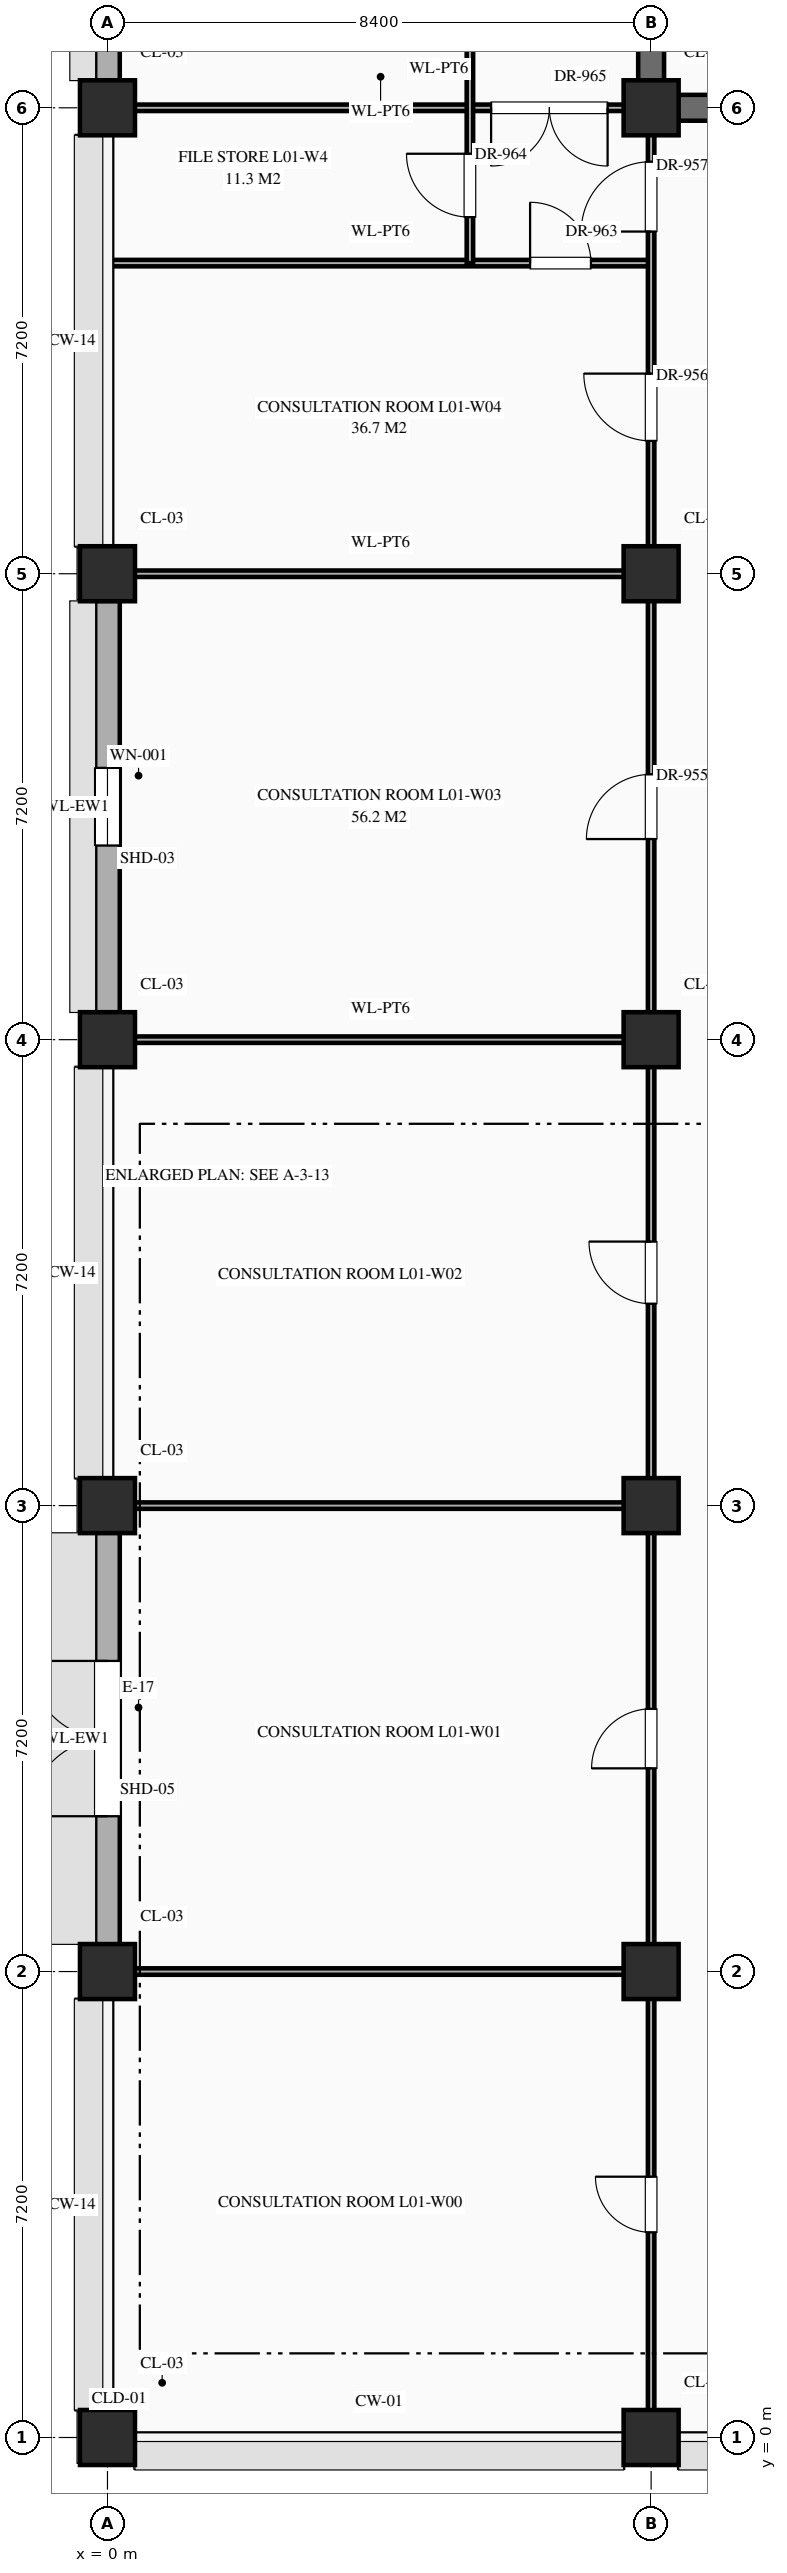
"""IFC4 building model, lengths in metres.
Left out: names, types, materials, properties, quantities, classifications, styles, units other than length and angle.
Written with IfcOpenShell. Run it as: python <this file> out.ifc"""

import sys

from ifc_helpers import new_model, si_unit, direction, frame, frame_2d, origin, origin_2d, place, context, subcontext, project, spatial, rectangle, extrude, element, fill, save


model = new_model("IFC4")
c1 = context("Model", 3, precision=1e-05, world=origin(), true_north=direction((0.0, 1.0)))
c2 = subcontext(c1, "Body", "Model", "MODEL_VIEW")
j1 = project(units=[si_unit("LENGTHUNIT", "METRE"), si_unit("PLANEANGLEUNIT", "RADIAN")], contexts=[c1])
p1 = place(None, origin())
s1 = spatial("IfcSite", under=j1, at=p1, CompositionType="ELEMENT")
p2 = place(p1, origin())
s2 = spatial("IfcBuilding", under=s1, at=p2, CompositionType="ELEMENT")
p3 = place(p2, origin())
s3 = spatial("IfcBuildingStorey", under=s2, at=p3, CompositionType="ELEMENT", Elevation=0.0)
for number, where, z_axis, x_axis in (
    (1, (0.0, 0.0, 0.0), (0.0, 0.0, 1.0), (1.0, 0.0, 0.0)),
    (2, (0.0, 7.2, 0.0), (0.0, 0.0, 1.0), (1.0, 0.0, 0.0)),
    (3, (0.0, 14.4, 0.0), (0.0, 0.0, 1.0), (1.0, 0.0, 0.0)),
    (4, (0.0, 21.6, 0.0), (0.0, 0.0, 1.0), (1.0, 0.0, 0.0)),
    (5, (0.0, 28.8, 0.0), (0.0, 0.0, 1.0), (1.0, 0.0, 0.0)),
    (6, (0.0, 36.0, 0.0), (0.0, 0.0, 1.0), (1.0, 0.0, 0.0)),
    (7, (8.4, 0.0, 0.0), (0.0, 0.0, 1.0), (1.0, 0.0, 0.0)),
    (8, (8.4, 7.2, 0.0), (0.0, 0.0, 1.0), (1.0, 0.0, 0.0)),
    (9, (8.4, 14.4, 0.0), (0.0, 0.0, 1.0), (1.0, 0.0, 0.0)),
    (10, (8.4, 21.6, 0.0), (0.0, 0.0, 1.0), (1.0, 0.0, 0.0)),
    (11, (8.4, 28.8, 0.0), (0.0, 0.0, 1.0), (1.0, 0.0, 0.0)),
    (12, (8.4, 36.0, 0.0), (0.0, 0.0, 1.0), (1.0, 0.0, 0.0)),
):
    element("IfcColumn", number, at=place(p3, frame(where, z_axis=z_axis, x_axis=x_axis)), inside=s3, PredefinedType="COLUMN", context=c2, shape_type="SweptSolid", body=[
        extrude(rectangle(XDim=0.85, YDim=0.85, at=origin_2d()), origin(), (0.0, 0.0, 1.0), 5.4),
    ])
p4 = place(p3, frame((0.0, 7.62, 0.0), z_axis=(0.0, 0.0, 1.0), x_axis=(0.0, 1.0, 0.0)))
e13 = element("IfcWall", 13, at=p4, inside=s3, PredefinedType="STANDARD", context=c2, shape_type="SweptSolid", body=[
    extrude(rectangle(XDim=6.36, YDim=0.38, at=frame_2d((3.18, 0.0))), origin(), (0.0, 0.0, 1.0), 4.47),
])
p5 = place(p4, frame((1.98, 0.0, 0.0)))
e14 = element("IfcOpeningElement", 14, at=p5, cuts=e13, PredefinedType="OPENING", context=c2, shape_type="SweptSolid", body=[
    extrude(rectangle(XDim=2.4, YDim=2.4, at=frame_2d((1.2, 1.2))), frame((0.0, 0.202, 0.0), z_axis=(0.0, -1.0, 0.0), x_axis=(1.0, 0.0, 0.0)), (0.0, 0.0, 1.0), 0.404),
])
p6 = place(p3, frame((0.0, 22.02, 0.0), z_axis=(0.0, 0.0, 1.0), x_axis=(0.0, 1.0, 0.0)))
e15 = element("IfcWall", 15, at=p6, inside=s3, PredefinedType="STANDARD", context=c2, shape_type="SweptSolid", body=[
    extrude(rectangle(XDim=6.36, YDim=0.38, at=frame_2d((3.18, 0.0))), origin(), (0.0, 0.0, 1.0), 4.47),
])
p7 = place(p6, frame((2.58, 0.0, 0.85)))
e16 = element("IfcOpeningElement", 16, at=p7, cuts=e15, PredefinedType="OPENING", context=c2, shape_type="SweptSolid", body=[
    extrude(rectangle(XDim=1.2, YDim=1.2, at=frame_2d((0.6, 0.6))), frame((0.0, 0.202, 0.0), z_axis=(0.0, -1.0, 0.0), x_axis=(1.0, 0.0, 0.0)), (0.0, 0.0, 1.0), 0.404),
])
p8 = place(p3, frame((0.0, 36.42, 0.0), z_axis=(0.0, 0.0, 1.0), x_axis=(0.0, 1.0, 0.0)))
e17 = element("IfcWall", 17, at=p8, inside=s3, PredefinedType="STANDARD", context=c2, shape_type="SweptSolid", body=[
    extrude(rectangle(XDim=6.36, YDim=0.38, at=frame_2d((3.18, 0.0))), origin(), (0.0, 0.0, 1.0), 4.47),
])
p9 = place(p8, frame((2.58, 0.0, 0.85)))
e18 = element("IfcOpeningElement", 18, at=p9, cuts=e17, PredefinedType="OPENING", context=c2, shape_type="SweptSolid", body=[
    extrude(rectangle(XDim=1.2, YDim=1.56, at=frame_2d((0.6, 0.78))), frame((0.0, 0.202, 0.0), z_axis=(0.0, -1.0, 0.0), x_axis=(1.0, 0.0, 0.0)), (0.0, 0.0, 1.0), 0.404),
])
for number, where, z_axis, x_axis in (
    (19, (0.04, 7.2, 0.0), (0.0, 0.0, 1.0), (1.0, 0.0, 0.0)),
    (20, (0.04, 14.4, 0.0), (0.0, 0.0, 1.0), (1.0, 0.0, 0.0)),
    (21, (0.04, 21.6, 0.0), (0.0, 0.0, 1.0), (1.0, 0.0, 0.0)),
    (22, (0.04, 28.8, 0.0), (0.0, 0.0, 1.0), (1.0, 0.0, 0.0)),
):
    element("IfcWall", number, at=place(p3, frame(where, z_axis=z_axis, x_axis=x_axis)), inside=s3, PredefinedType="STANDARD", context=c2, shape_type="SweptSolid", body=[
        extrude(rectangle(XDim=8.36, YDim=0.1, at=frame_2d((4.18, 0.0))), origin(), (0.0, 0.0, 1.0), 4.27),
    ])
p10 = place(p3, frame((0.04, 33.6, 0.0), z_axis=(0.0, 0.0, 1.0), x_axis=(1.0, 0.0, 0.0)))
e23 = element("IfcWall", 23, at=p10, inside=s3, PredefinedType="STANDARD", context=c2, shape_type="SweptSolid", body=[
    extrude(rectangle(XDim=8.36, YDim=0.1, at=frame_2d((4.18, 0.0))), origin(), (0.0, 0.0, 1.0), 5.12),
])
p11 = place(p10, frame((6.49, 0.0, 0.0)))
e24 = element("IfcOpeningElement", 24, at=p11, cuts=e23, PredefinedType="OPENING", context=c2, shape_type="SweptSolid", body=[
    extrude(rectangle(XDim=0.94, YDim=2.3, at=frame_2d((0.47, 1.15))), frame((0.0, 0.062, 0.0), z_axis=(0.0, -1.0, 0.0), x_axis=(1.0, 0.0, 0.0)), (0.0, 0.0, 1.0), 0.124),
])
p12 = place(p3, frame((0.04, 36.0, 0.0), z_axis=(0.0, 0.0, 1.0), x_axis=(1.0, 0.0, 0.0)))
e25 = element("IfcWall", 25, at=p12, inside=s3, PredefinedType="STANDARD", context=c2, shape_type="SweptSolid", body=[
    extrude(rectangle(XDim=8.36, YDim=0.1, at=frame_2d((4.18, 0.0))), origin(), (0.0, 0.0, 1.0), 4.27),
])
p13 = place(p12, frame((5.887, 0.0, 0.0)))
e26 = element("IfcOpeningElement", 26, at=p13, cuts=e25, PredefinedType="OPENING", context=c2, shape_type="SweptSolid", body=[
    extrude(rectangle(XDim=1.8, YDim=2.5, at=frame_2d((0.9, 1.25))), frame((0.0, 0.062, 0.0), z_axis=(0.0, -1.0, 0.0), x_axis=(1.0, 0.0, 0.0)), (0.0, 0.0, 1.0), 0.124),
])
p14 = place(p3, frame((8.4, 36.0, 0.0), z_axis=(0.0, 0.0, 1.0), x_axis=(1.0, 0.0, 0.0)))
e27 = element("IfcWall", 27, at=p14, inside=s3, PredefinedType="SHEAR", context=c2, shape_type="SweptSolid", body=[
    extrude(rectangle(XDim=8.36, YDim=0.4, at=frame_2d((4.18, 0.0))), origin(), (0.0, 0.0, 1.0), 5.12),
])
p15 = place(p3, frame((5.6, 33.6, 0.0), z_axis=(0.0, 0.0, 1.0), x_axis=(0.0, 1.0, 0.0)))
e28 = element("IfcWall", 28, at=p15, inside=s3, PredefinedType="STANDARD", context=c2, shape_type="SweptSolid", body=[
    extrude(rectangle(XDim=12.0, YDim=0.1, at=frame_2d((6.0, 0.0))), origin(), (0.0, 0.0, 1.0), 5.12),
])
p16 = place(p15, frame((0.71, 0.0, 0.0)))
e29 = element("IfcOpeningElement", 29, at=p16, cuts=e28, PredefinedType="OPENING", context=c2, shape_type="SweptSolid", body=[
    extrude(rectangle(XDim=0.98, YDim=2.35, at=frame_2d((0.49, 1.175))), frame((0.0, 0.062, 0.0), z_axis=(0.0, -1.0, 0.0), x_axis=(1.0, 0.0, 0.0)), (0.0, 0.0, 1.0), 0.124),
])
p17 = place(p15, frame((5.47, 0.0, 0.0)))
e30 = element("IfcOpeningElement", 30, at=p17, cuts=e28, PredefinedType="OPENING", context=c2, shape_type="SweptSolid", body=[
    extrude(rectangle(XDim=1.06, YDim=2.4, at=frame_2d((0.53, 1.2))), frame((0.0, 0.062, 0.0), z_axis=(0.0, -1.0, 0.0), x_axis=(1.0, 0.0, 0.0)), (0.0, 0.0, 1.0), 0.124),
])
p18 = place(p15, frame((10.35, 0.0, 0.0)))
e31 = element("IfcOpeningElement", 31, at=p18, cuts=e28, PredefinedType="OPENING", context=c2, shape_type="SweptSolid", body=[
    extrude(rectangle(XDim=0.9, YDim=2.15, at=frame_2d((0.45, 1.075))), frame((0.0, 0.062, 0.0), z_axis=(0.0, -1.0, 0.0), x_axis=(1.0, 0.0, 0.0)), (0.0, 0.0, 1.0), 0.124),
])
p19 = place(p3, frame((8.4, 0.04, 0.0), z_axis=(0.0, 0.0, 1.0), x_axis=(0.0, 1.0, 0.0)))
e32 = element("IfcWall", 32, at=p19, inside=s3, PredefinedType="STANDARD", context=c2, shape_type="SweptSolid", body=[
    extrude(rectangle(XDim=35.96, YDim=0.1, at=frame_2d((17.98, 0.0))), origin(), (0.0, 0.0, 1.0), 4.37),
])
p20 = place(p19, frame((3.13, 0.0, 0.0)))
e33 = element("IfcOpeningElement", 33, at=p20, cuts=e32, PredefinedType="OPENING", context=c2, shape_type="SweptSolid", body=[
    extrude(rectangle(XDim=0.86, YDim=2.1, at=frame_2d((0.43, 1.05))), frame((0.0, 0.062, 0.0), z_axis=(0.0, -1.0, 0.0), x_axis=(1.0, 0.0, 0.0)), (0.0, 0.0, 1.0), 0.124),
])
p21 = place(p19, frame((10.3, 0.0, 0.0)))
e34 = element("IfcOpeningElement", 34, at=p21, cuts=e32, PredefinedType="OPENING", context=c2, shape_type="SweptSolid", body=[
    extrude(rectangle(XDim=0.92, YDim=2.15, at=frame_2d((0.46, 1.075))), frame((0.0, 0.062, 0.0), z_axis=(0.0, -1.0, 0.0), x_axis=(1.0, 0.0, 0.0)), (0.0, 0.0, 1.0), 0.124),
])
p22 = place(p19, frame((17.48, 0.0, 0.0)))
e35 = element("IfcOpeningElement", 35, at=p22, cuts=e32, PredefinedType="OPENING", context=c2, shape_type="SweptSolid", body=[
    extrude(rectangle(XDim=0.96, YDim=2.2, at=frame_2d((0.48, 1.1))), frame((0.0, 0.062, 0.0), z_axis=(0.0, -1.0, 0.0), x_axis=(1.0, 0.0, 0.0)), (0.0, 0.0, 1.0), 0.124),
])
p23 = place(p19, frame((24.66, 0.0, 0.0)))
e36 = element("IfcOpeningElement", 36, at=p23, cuts=e32, PredefinedType="OPENING", context=c2, shape_type="SweptSolid", body=[
    extrude(rectangle(XDim=1.0, YDim=2.25, at=frame_2d((0.5, 1.125))), frame((0.0, 0.062, 0.0), z_axis=(0.0, -1.0, 0.0), x_axis=(1.0, 0.0, 0.0)), (0.0, 0.0, 1.0), 0.124),
])
p24 = place(p19, frame((30.812, 0.0, 0.0)))
e37 = element("IfcOpeningElement", 37, at=p24, cuts=e32, PredefinedType="OPENING", context=c2, shape_type="SweptSolid", body=[
    extrude(rectangle(XDim=1.04, YDim=2.2, at=frame_2d((0.52, 1.1))), frame((0.0, 0.062, 0.0), z_axis=(0.0, -1.0, 0.0), x_axis=(1.0, 0.0, 0.0)), (0.0, 0.0, 1.0), 0.124),
])
p25 = place(p19, frame((34.048, 0.0, 0.0)))
e38 = element("IfcOpeningElement", 38, at=p25, cuts=e32, PredefinedType="OPENING", context=c2, shape_type="SweptSolid", body=[
    extrude(rectangle(XDim=1.08, YDim=2.25, at=frame_2d((0.54, 1.125))), frame((0.0, 0.062, 0.0), z_axis=(0.0, -1.0, 0.0), x_axis=(1.0, 0.0, 0.0)), (0.0, 0.0, 1.0), 0.124),
])
p26 = place(p3, frame((8.4, 36.0, 0.0), z_axis=(0.0, 0.0, 1.0), x_axis=(0.0, 1.0, 0.0)))
e39 = element("IfcWall", 39, at=p26, inside=s3, PredefinedType="SHEAR", context=c2, shape_type="SweptSolid", body=[
    extrude(rectangle(XDim=4.8, YDim=0.4, at=frame_2d((2.4, 0.0))), origin(), (0.0, 0.0, 1.0), 5.12),
])
p27 = place(p5, origin())
e40 = element("IfcDoor", 40, at=p27, inside=s3, OperationType="DOUBLE_DOOR_SINGLE_SWING", PredefinedType="DOOR", context=c2, shape_type="SweptSolid", body=[
    extrude(rectangle(XDim=2.4, YDim=2.4, at=frame_2d((1.2, 1.2))), frame((0.0, 0.025, 0.0), z_axis=(0.0, -1.0, 0.0), x_axis=(1.0, 0.0, 0.0)), (0.0, 0.0, 1.0), 0.05),
])
fill(e14, e40)
p28 = place(p7, origin())
e41 = element("IfcWindow", 41, at=p28, inside=s3, PartitioningType="SINGLE_PANEL", PredefinedType="WINDOW", context=c2, shape_type="SweptSolid", body=[
    extrude(rectangle(XDim=1.2, YDim=1.2, at=frame_2d((0.6, 0.6))), frame((0.0, 0.03, 0.0), z_axis=(0.0, -1.0, 0.0), x_axis=(1.0, 0.0, 0.0)), (0.0, 0.0, 1.0), 0.06),
])
fill(e16, e41)
p29 = place(p20, origin())
e42 = element("IfcDoor", 42, at=p29, inside=s3, OperationType="SINGLE_SWING_RIGHT", PredefinedType="DOOR", context=c2, shape_type="SweptSolid", body=[
    extrude(rectangle(XDim=0.86, YDim=2.1, at=frame_2d((0.43, 1.05))), frame((0.0, 0.025, 0.0), z_axis=(0.0, -1.0, 0.0), x_axis=(1.0, 0.0, 0.0)), (0.0, 0.0, 1.0), 0.05),
])
fill(e33, e42)
p30 = place(p21, origin())
e43 = element("IfcDoor", 43, at=p30, inside=s3, OperationType="SINGLE_SWING_LEFT", PredefinedType="DOOR", context=c2, shape_type="SweptSolid", body=[
    extrude(rectangle(XDim=0.92, YDim=2.15, at=frame_2d((0.46, 1.075))), frame((0.0, 0.025, 0.0), z_axis=(0.0, -1.0, 0.0), x_axis=(1.0, 0.0, 0.0)), (0.0, 0.0, 1.0), 0.05),
])
fill(e34, e43)
p31 = place(p22, origin())
e44 = element("IfcDoor", 44, at=p31, inside=s3, OperationType="SINGLE_SWING_RIGHT", PredefinedType="DOOR", context=c2, shape_type="SweptSolid", body=[
    extrude(rectangle(XDim=0.96, YDim=2.2, at=frame_2d((0.48, 1.1))), frame((0.0, 0.025, 0.0), z_axis=(0.0, -1.0, 0.0), x_axis=(1.0, 0.0, 0.0)), (0.0, 0.0, 1.0), 0.05),
])
fill(e35, e44)
p32 = place(p23, origin())
e45 = element("IfcDoor", 45, at=p32, inside=s3, OperationType="SINGLE_SWING_LEFT", PredefinedType="DOOR", context=c2, shape_type="SweptSolid", body=[
    extrude(rectangle(XDim=1.0, YDim=2.25, at=frame_2d((0.5, 1.125))), frame((0.0, 0.025, 0.0), z_axis=(0.0, -1.0, 0.0), x_axis=(1.0, 0.0, 0.0)), (0.0, 0.0, 1.0), 0.05),
])
fill(e36, e45)
p33 = place(p24, origin())
e46 = element("IfcDoor", 46, at=p33, inside=s3, OperationType="SINGLE_SWING_RIGHT", PredefinedType="DOOR", context=c2, shape_type="SweptSolid", body=[
    extrude(rectangle(XDim=1.04, YDim=2.2, at=frame_2d((0.52, 1.1))), frame((0.0, 0.025, 0.0), z_axis=(0.0, -1.0, 0.0), x_axis=(1.0, 0.0, 0.0)), (0.0, 0.0, 1.0), 0.05),
])
fill(e37, e46)
p34 = place(p25, origin())
e47 = element("IfcDoor", 47, at=p34, inside=s3, OperationType="SINGLE_SWING_LEFT", PredefinedType="DOOR", context=c2, shape_type="SweptSolid", body=[
    extrude(rectangle(XDim=1.08, YDim=2.25, at=frame_2d((0.54, 1.125))), frame((0.0, 0.025, 0.0), z_axis=(0.0, -1.0, 0.0), x_axis=(1.0, 0.0, 0.0)), (0.0, 0.0, 1.0), 0.05),
])
fill(e38, e47)
p35 = place(p11, origin())
e48 = element("IfcDoor", 48, at=p35, inside=s3, OperationType="SINGLE_SWING_LEFT", PredefinedType="DOOR", context=c2, shape_type="SweptSolid", body=[
    extrude(rectangle(XDim=0.94, YDim=2.3, at=frame_2d((0.47, 1.15))), frame((0.0, 0.025, 0.0), z_axis=(0.0, -1.0, 0.0), x_axis=(1.0, 0.0, 0.0)), (0.0, 0.0, 1.0), 0.05),
])
fill(e24, e48)
p36 = place(p16, origin())
e49 = element("IfcDoor", 49, at=p36, inside=s3, OperationType="SINGLE_SWING_RIGHT", PredefinedType="DOOR", context=c2, shape_type="SweptSolid", body=[
    extrude(rectangle(XDim=0.98, YDim=2.35, at=frame_2d((0.49, 1.175))), frame((0.0, 0.025, 0.0), z_axis=(0.0, -1.0, 0.0), x_axis=(1.0, 0.0, 0.0)), (0.0, 0.0, 1.0), 0.05),
])
fill(e29, e49)
p37 = place(p13, frame((1.8, 0.0, 0.0), z_axis=(0.0, 0.0, 1.0), x_axis=(-1.0, 0.0, 0.0)))
e50 = element("IfcDoor", 50, at=p37, inside=s3, OperationType="DOUBLE_DOOR_SINGLE_SWING", PredefinedType="DOOR", context=c2, shape_type="SweptSolid", body=[
    extrude(rectangle(XDim=1.8, YDim=2.5, at=frame_2d((0.9, 1.25))), frame((0.0, 0.025, 0.0), z_axis=(0.0, -1.0, 0.0), x_axis=(1.0, 0.0, 0.0)), (0.0, 0.0, 1.0), 0.05),
])
fill(e26, e50)
save(model, sys.argv[1])
